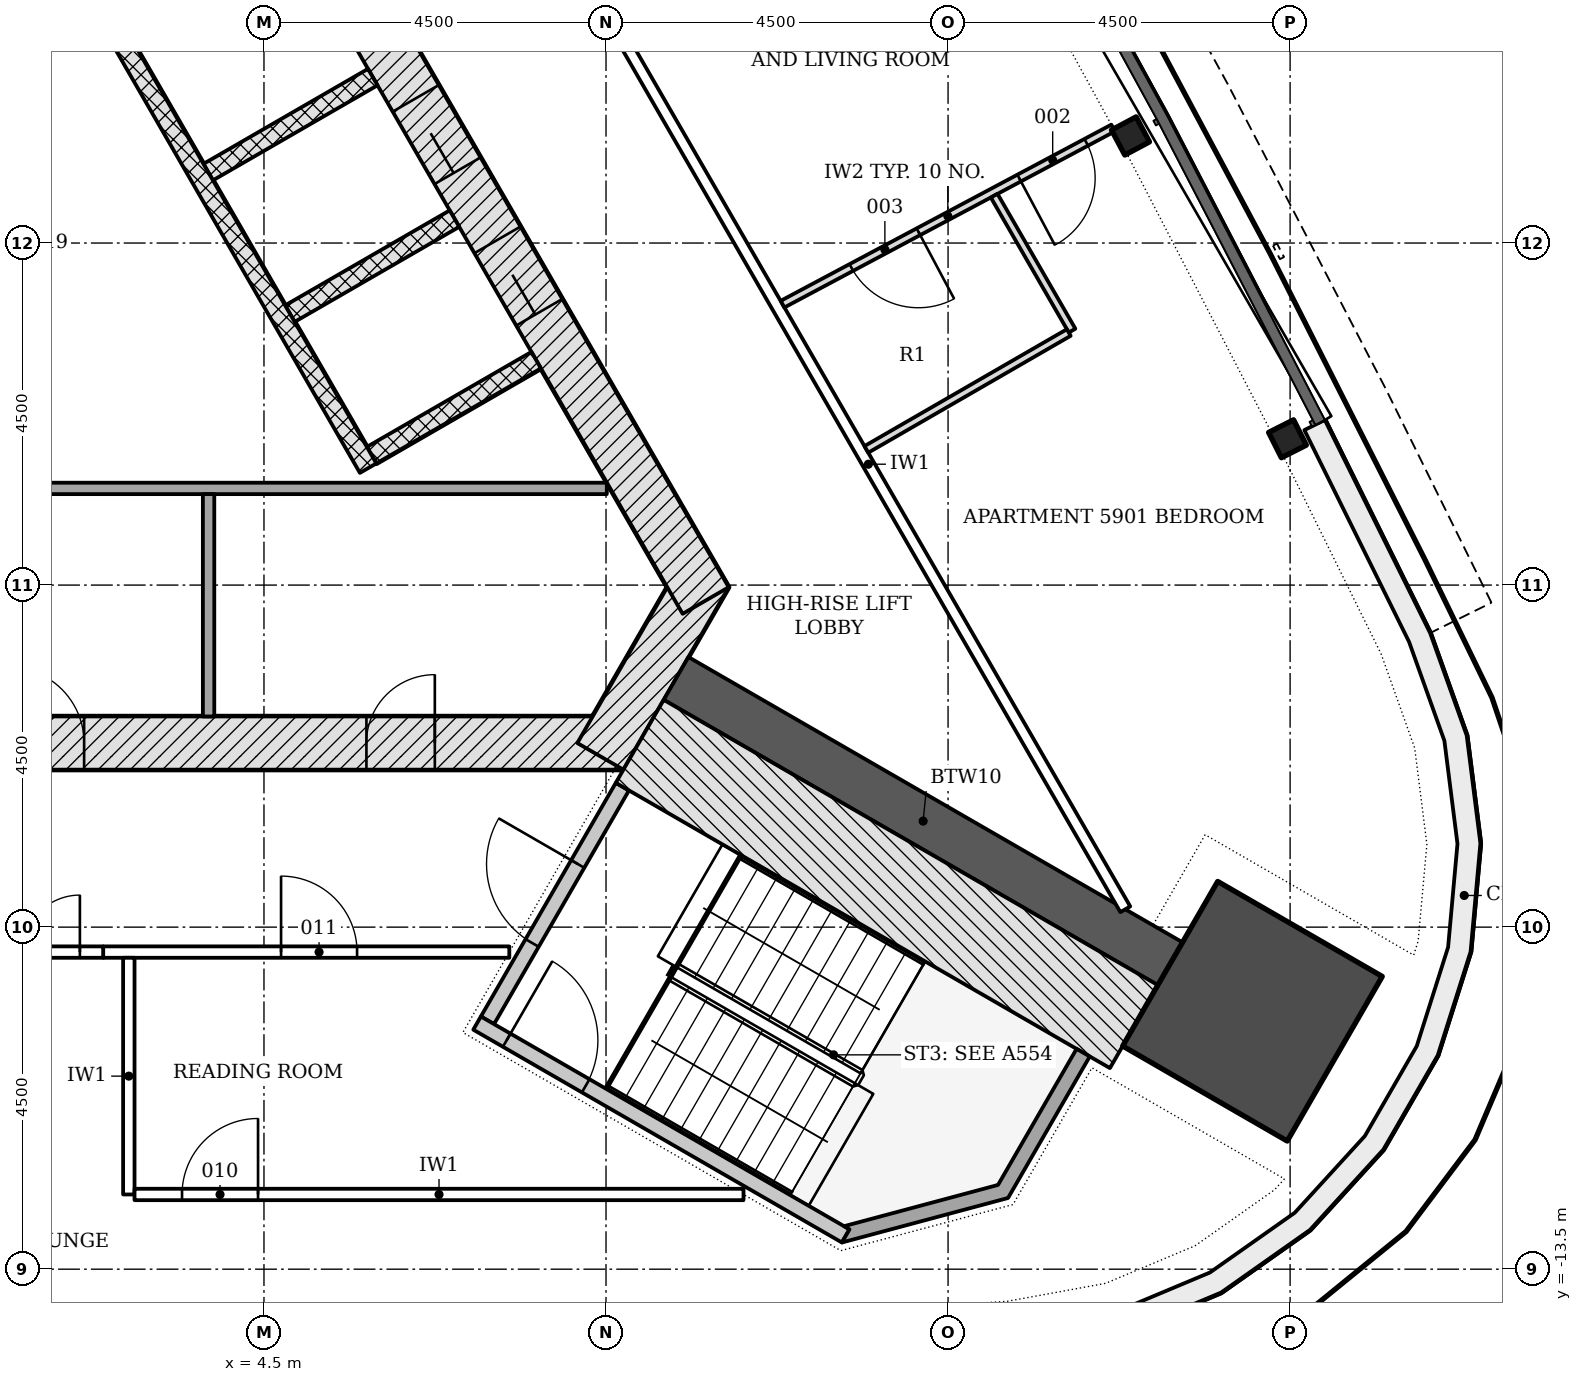
"""IFC4 building model, lengths in metres.
Left out: names, types, materials, properties, quantities, classifications, styles, units other than length and angle.
Written with IfcOpenShell. Run it as: python <this file> out.ifc"""

import sys

from ifc_helpers import new_model, si_unit, direction, frame, frame_2d, origin, origin_2d, place, context, subcontext, project, spatial, polyline, rectangle, i_section, outline, extrude, element, fill, save


model = new_model("IFC4")
c1 = context("Model", 3, precision=1e-05, world=origin(), true_north=direction((0.0, 1.0)))
c2 = subcontext(c1, "Body", "Model", "MODEL_VIEW")
j1 = project(units=[si_unit("LENGTHUNIT", "METRE"), si_unit("PLANEANGLEUNIT", "RADIAN")], contexts=[c1])
p1 = place(None, origin())
s1 = spatial("IfcSite", under=j1, at=p1, CompositionType="ELEMENT")
p2 = place(p1, origin())
s2 = spatial("IfcBuilding", under=s1, at=p2, CompositionType="ELEMENT")
p3 = place(p2, frame((0.0, 0.0, 229.2)))
s3 = spatial("IfcBuildingStorey", under=s2, at=p3, CompositionType="ELEMENT", Elevation=229.2)
p4 = place(p3, frame((-9.229, -6.578, -0.2), z_axis=(0.0, 0.0, 1.0), x_axis=(1.0, 0.0, 0.0)))
e1 = element("IfcWall", 1, at=p4, inside=s3, PredefinedType="SHEAR", context=c2, shape_type="SweptSolid", body=[
    extrude(rectangle(XDim=18.458, YDim=0.7, at=frame_2d((9.229, 0.0))), origin(), (0.0, 0.0, 1.0), 3.6),
])
p5 = place(p4, frame((7.5, 0.0, 0.2)))
e2 = element("IfcOpeningElement", 2, at=p5, cuts=e1, PredefinedType="OPENING", context=c2, shape_type="SweptSolid", body=[
    extrude(rectangle(XDim=1.0, YDim=2.1, at=frame_2d((0.5, 1.05))), frame((0.0, 0.36, 0.0), z_axis=(0.0, -1.0, 0.0), x_axis=(1.0, 0.0, 0.0)), (0.0, 0.0, 1.0), 0.72),
])
p6 = place(p4, frame((3.389, 0.0, 0.2)))
e3 = element("IfcOpeningElement", 3, at=p6, cuts=e1, PredefinedType="OPENING", context=c2, shape_type="SweptSolid", body=[
    extrude(rectangle(XDim=0.9, YDim=2.1, at=frame_2d((0.45, 1.05))), frame((0.0, 0.36, 0.0), z_axis=(0.0, -1.0, 0.0), x_axis=(1.0, 0.0, 0.0)), (0.0, 0.0, 1.0), 0.72),
])
p7 = place(p4, frame((10.363, 0.0, 0.2)))
e4 = element("IfcOpeningElement", 4, at=p7, cuts=e1, PredefinedType="OPENING", context=c2, shape_type="SweptSolid", body=[
    extrude(rectangle(XDim=1.0, YDim=2.1, at=frame_2d((0.5, 1.05))), frame((0.0, 0.36, 0.0), z_axis=(0.0, -1.0, 0.0), x_axis=(1.0, 0.0, 0.0)), (0.0, 0.0, 1.0), 0.72),
])
p8 = place(p4, frame((15.077, 0.0, 0.2)))
e5 = element("IfcOpeningElement", 5, at=p8, cuts=e1, PredefinedType="OPENING", context=c2, shape_type="SweptSolid", body=[
    extrude(rectangle(XDim=0.9, YDim=2.1, at=frame_2d((0.45, 1.05))), frame((0.0, 0.36, 0.0), z_axis=(0.0, -1.0, 0.0), x_axis=(1.0, 0.0, 0.0)), (0.0, 0.0, 1.0), 0.72),
])
p9 = place(p3, frame((8.926, -6.753, -0.2), z_axis=(0.0, 0.0, 1.0), x_axis=(0.500042739161, 0.866000726912, 0.0)))
e6 = element("IfcWall", 6, at=p9, inside=s3, PredefinedType="SHEAR", context=c2, shape_type="SweptSolid", body=[
    extrude(rectangle(XDim=2.771, YDim=0.7, at=frame_2d((1.386, 0.0))), origin(), (0.0, 0.0, 1.0), 3.6),
])
p10 = place(p3, frame((10.311, -4.703, -0.2), z_axis=(0.0, 0.0, 1.0), x_axis=(-0.500001446645, 0.866024568562, 0.0)))
e7 = element("IfcWall", 7, at=p10, inside=s3, PredefinedType="SHEAR", context=c2, shape_type="SweptSolid", body=[
    extrude(rectangle(XDim=18.458, YDim=0.7, at=frame_2d((9.229, 0.0))), origin(), (0.0, 0.0, 1.0), 3.6),
])
p11 = place(p10, frame((4.379, 0.0, 0.2)))
e8 = element("IfcOpeningElement", 8, at=p11, cuts=e7, PredefinedType="OPENING", context=c2, shape_type="SweptSolid", body=[
    extrude(rectangle(XDim=1.1, YDim=2.1, at=frame_2d((0.55, 1.05))), frame((0.0, 0.36, 0.0), z_axis=(0.0, -1.0, 0.0), x_axis=(1.0, 0.0, 0.0)), (0.0, 0.0, 1.0), 0.72),
])
p12 = place(p10, frame((6.529, 0.0, 0.2)))
e9 = element("IfcOpeningElement", 9, at=p12, cuts=e7, PredefinedType="OPENING", context=c2, shape_type="SweptSolid", body=[
    extrude(rectangle(XDim=1.1, YDim=2.1, at=frame_2d((0.55, 1.05))), frame((0.0, 0.36, 0.0), z_axis=(0.0, -1.0, 0.0), x_axis=(1.0, 0.0, 0.0)), (0.0, 0.0, 1.0), 0.72),
])
p13 = place(p10, frame((8.679, 0.0, 0.2)))
e10 = element("IfcOpeningElement", 10, at=p13, cuts=e7, PredefinedType="OPENING", context=c2, shape_type="SweptSolid", body=[
    extrude(rectangle(XDim=1.1, YDim=2.1, at=frame_2d((0.55, 1.05))), frame((0.0, 0.36, 0.0), z_axis=(0.0, -1.0, 0.0), x_axis=(1.0, 0.0, 0.0)), (0.0, 0.0, 1.0), 0.72),
])
p14 = place(p10, frame((10.829, 0.0, 0.2)))
e11 = element("IfcOpeningElement", 11, at=p14, cuts=e7, PredefinedType="OPENING", context=c2, shape_type="SweptSolid", body=[
    extrude(rectangle(XDim=1.1, YDim=2.1, at=frame_2d((0.55, 1.05))), frame((0.0, 0.36, 0.0), z_axis=(0.0, -1.0, 0.0), x_axis=(1.0, 0.0, 0.0)), (0.0, 0.0, 1.0), 0.72),
])
p15 = place(p10, frame((12.979, 0.0, 0.2)))
e12 = element("IfcOpeningElement", 12, at=p15, cuts=e7, PredefinedType="OPENING", context=c2, shape_type="SweptSolid", body=[
    extrude(rectangle(XDim=1.1, YDim=2.1, at=frame_2d((0.55, 1.05))), frame((0.0, 0.36, 0.0), z_axis=(0.0, -1.0, 0.0), x_axis=(1.0, 0.0, 0.0)), (0.0, 0.0, 1.0), 0.72),
])
p16 = place(p3, frame((9.922, -5.728, -0.2), z_axis=(0.0, 0.0, 1.0), x_axis=(0.866026891245, -0.499997423634, 0.0)))
e13 = element("IfcWall", 13, at=p16, inside=s3, PredefinedType="SHEAR", context=c2, shape_type="SweptSolid", body=[
    extrude(rectangle(XDim=7.506, YDim=0.65, at=frame_2d((3.753, 0.0))), origin(), (0.0, 0.0, 1.0), 3.6),
])
p17 = place(p3, frame((17.505, -10.106, -0.2), z_axis=(0.0, 0.0, 1.0), x_axis=(0.866025403784, -0.5, 0.0)))
e14 = element("IfcColumn", 14, at=p17, inside=s3, PredefinedType="COLUMN", context=c2, shape_type="SweptSolid", body=[
    extrude(rectangle(XDim=2.5, YDim=2.5, at=origin_2d()), origin(), (0.0, 0.0, 1.0), 3.6),
])
for number, where, z_axis, x_axis in (
    (15, (17.965, -2.575, -0.2), (0.0, 0.0, 1.0), (-0.45, 0.893, 0.0)),
    (16, (15.9, 1.409, -0.2), (0.0, 0.0, 1.0), (-0.47, 0.883, 0.0)),
):
    element("IfcColumn", number, at=place(p3, frame(where, z_axis=z_axis, x_axis=x_axis)), inside=s3, PredefinedType="COLUMN", context=c2, shape_type="SweptSolid", body=[
        extrude(i_section(OverallWidth=0.373, OverallDepth=0.368, WebThickness=0.015, FlangeThickness=0.024, FilletRadius=0.015, at=origin_2d()), origin(), (0.0, 0.0, 1.0), 3.6),
    ])
p18 = place(p3, origin())
e17 = element("IfcWall", 17, at=p18, inside=s3, PredefinedType="NOTDEFINED", context=c2, shape_type="SweptSolid", body=[
    extrude(outline(polyline([(11.244, -14.82), (14.364, -14.619), (15.772, -14.361), (17.092, -13.808), (18.261, -12.983), (19.227, -11.927), (19.942, -10.687), (20.375, -9.323), (20.504, -7.898), (20.323, -6.478), (19.842, -5.13), (18.457, -2.328), (18.188, -2.46), (19.565, -5.248), (20.03, -6.548), (20.202, -7.903), (20.079, -9.264), (19.666, -10.566), (18.983, -11.748), (18.062, -12.757), (16.945, -13.544), (15.686, -14.072), (14.327, -14.32), (11.225, -14.521), (11.244, -14.82)])), origin(), (0.0, 0.0, 1.0), 3.3),
])
for number, where, z_axis, x_axis in (
    (18, (8.081, -1.541, -0.2), (0.0, 0.0, 1.0), (-0.866, -0.5, 0.0)),
    (19, (7.006, 0.321, -0.2), (0.0, 0.0, 1.0), (-0.866, -0.5, 0.0)),
):
    element("IfcWall", number, at=place(p3, frame(where, z_axis=z_axis, x_axis=x_axis)), inside=s3, PredefinedType="PARTITIONING", context=c2, shape_type="SweptSolid", body=[
        extrude(rectangle(XDim=2.5, YDim=0.25, at=frame_2d((1.25, 0.0))), origin(), (0.0, 0.0, 1.0), 3.6),
    ])
p19 = place(p3, frame((5.931, 2.183, -0.2), z_axis=(0.0, 0.0, 1.0), x_axis=(-0.866047370643, -0.499961950354, 0.0)))
e20 = element("IfcWall", 20, at=p19, inside=s3, PredefinedType="PARTITIONING", context=c2, shape_type="SweptSolid", body=[
    extrude(rectangle(XDim=2.5, YDim=0.25, at=frame_2d((1.25, 0.0))), origin(), (0.0, 0.0, 1.0), 3.6),
])
p20 = place(p3, frame((5.87, -2.961, 0.0), z_axis=(0.0, 0.0, 1.0), x_axis=(-0.50000615651, 0.866021849293, 0.0)))
e21 = element("IfcWall", 21, at=p20, inside=s3, PredefinedType="PARTITIONING", context=c2, shape_type="SweptSolid", body=[
    extrude(rectangle(XDim=11.0, YDim=0.25, at=frame_2d((5.5, 0.0))), origin(), (0.0, 0.0, 1.0), 3.4),
])
p21 = place(p3, frame((-0.129, -3.228, 0.0), z_axis=(0.0, 0.0, 1.0), x_axis=(1.0, 0.0, 0.0)))
e22 = element("IfcWall", 22, at=p21, inside=s3, PredefinedType="PARTITIONING", context=c2, shape_type="SweptSolid", body=[
    extrude(rectangle(XDim=9.139, YDim=0.15, at=frame_2d((4.57, 0.0))), origin(), (0.0, 0.0, 1.0), 3.4),
])
p22 = place(p3, frame((3.771, -3.303, 0.0), z_axis=(0.0, 0.0, 1.0), x_axis=(0.0, -1.0, 0.0)))
e23 = element("IfcWall", 23, at=p22, inside=s3, PredefinedType="PARTITIONING", context=c2, shape_type="SweptSolid", body=[
    extrude(rectangle(XDim=2.925, YDim=0.15, at=frame_2d((1.462, 0.0))), origin(), (0.0, 0.0, 1.0), 3.4),
])
p23 = place(p3, frame((7.44, -10.226, -0.2), z_axis=(0.0, 0.0, 1.0), x_axis=(0.500022077904, 0.866012656725, 0.0)))
e24 = element("IfcWall", 24, at=p23, inside=s3, PredefinedType="SHEAR", context=c2, shape_type="SweptSolid", body=[
    extrude(rectangle(XDim=3.55, YDim=0.2, at=frame_2d((1.775, 0.0))), origin(), (0.0, 0.0, 1.0), 3.6),
])
p24 = place(p23, frame((1.175, 0.0, 0.2)))
e25 = element("IfcOpeningElement", 25, at=p24, cuts=e24, PredefinedType="OPENING", context=c2, shape_type="SweptSolid", body=[
    extrude(rectangle(XDim=1.2, YDim=2.1, at=frame_2d((0.6, 1.05))), frame((0.0, 0.11, 0.0), z_axis=(0.0, -1.0, 0.0), x_axis=(1.0, 0.0, 0.0)), (0.0, 0.0, 1.0), 0.22),
])
p25 = place(p3, frame((7.304, -10.262, -0.2), z_axis=(0.0, 0.0, 1.0), x_axis=(0.866026594901, -0.49999793692, 0.0)))
e26 = element("IfcWall", 26, at=p25, inside=s3, PredefinedType="SHEAR", context=c2, shape_type="SweptSolid", body=[
    extrude(rectangle(XDim=5.6, YDim=0.2, at=frame_2d((2.8, 0.0))), origin(), (0.0, 0.0, 1.0), 3.6),
])
p26 = place(p25, frame((0.45, 0.0, 0.2)))
e27 = element("IfcOpeningElement", 27, at=p26, cuts=e26, PredefinedType="OPENING", context=c2, shape_type="SweptSolid", body=[
    extrude(rectangle(XDim=1.2, YDim=2.1, at=frame_2d((0.6, 1.05))), frame((0.0, 0.11, 0.0), z_axis=(0.0, -1.0, 0.0), x_axis=(1.0, 0.0, 0.0)), (0.0, 0.0, 1.0), 0.22),
])
p27 = place(p3, frame((9.444, -6.555, -0.2), z_axis=(0.0, 0.0, 1.0), x_axis=(0.866020939036, -0.500007733091, 0.0)))
e28 = element("IfcWall", 28, at=p27, inside=s3, PredefinedType="SHEAR", context=c2, shape_type="SweptSolid", body=[
    extrude(rectangle(XDim=7.507, YDim=1.261, at=frame_2d((3.753, 0.0))), origin(), (0.0, 0.0, 1.0), 3.6),
])
p28 = place(p3, frame((0.0, 0.0, -0.2)))
e29 = element("IfcWall", 29, at=p28, inside=s3, PredefinedType="SHEAR", context=c2, shape_type="SweptSolid", body=[
    extrude(outline(polyline([(12.104, -13.149), (14.289, -12.563), (15.364, -10.701), (15.191, -10.601), (14.157, -12.392), (12.132, -12.934), (12.204, -12.976), (12.204, -12.976), (12.204, -12.976), (12.204, -12.976), (12.204, -12.976), (12.204, -12.976), (12.204, -12.976), (12.204, -12.976), (12.204, -12.976), (12.204, -12.976), (12.204, -12.976), (12.204, -12.976), (12.204, -12.976), (12.204, -12.976), (12.204, -12.976), (12.204, -12.976), (12.204, -12.976), (12.104, -13.149)])), origin(), (0.0, 0.0, 1.0), 3.6),
])
p29 = place(p3, frame((15.832, -8.765, 0.0), z_axis=(0.0, 0.0, 1.0), x_axis=(-0.500008967739, 0.866020226196, 0.0)))
e30 = element("IfcWall", 30, at=p29, inside=s3, PredefinedType="PARTITIONING", context=c2, shape_type="SweptSolid", body=[
    extrude(rectangle(XDim=13.523, YDim=0.15, at=frame_2d((6.761, 0.0))), origin(), (0.0, 0.0, 1.0), 2.852),
])
p30 = place(p3, frame((15.672, 1.514, 0.0), z_axis=(0.0, 0.0, 1.0), x_axis=(-0.882503735513, -0.47030538675, 0.0)))
e31 = element("IfcWall", 31, at=p30, inside=s3, PredefinedType="PARTITIONING", context=c2, shape_type="SweptSolid", body=[
    extrude(rectangle(XDim=4.928, YDim=0.1, at=frame_2d((2.464, 0.0))), origin(), (0.0, 0.0, 1.0), 3.4),
])
p31 = place(p30, frame((0.401, 0.0, 0.0)))
e32 = element("IfcOpeningElement", 32, at=p31, cuts=e31, PredefinedType="OPENING", context=c2, shape_type="SweptSolid", body=[
    extrude(rectangle(XDim=1.0, YDim=2.1, at=frame_2d((0.5, 1.05))), frame((0.0, 0.06, 0.0), z_axis=(0.0, -1.0, 0.0), x_axis=(1.0, 0.0, 0.0)), (0.0, 0.0, 1.0), 0.12),
])
p32 = place(p30, frame((2.903, 0.0, 0.0)))
e33 = element("IfcOpeningElement", 33, at=p32, cuts=e31, PredefinedType="OPENING", context=c2, shape_type="SweptSolid", body=[
    extrude(rectangle(XDim=1.0, YDim=2.1, at=frame_2d((0.5, 1.05))), frame((0.0, 0.06, 0.0), z_axis=(0.0, -1.0, 0.0), x_axis=(1.0, 0.0, 0.0)), (0.0, 0.0, 1.0), 0.12),
])
p33 = place(p3, frame((14.107, 0.623, 0.0), z_axis=(0.0, 0.0, 1.0), x_axis=(0.499956128963, -0.866050731258, 0.0)))
e34 = element("IfcWall", 34, at=p33, inside=s3, PredefinedType="PARTITIONING", context=c2, shape_type="SweptSolid", body=[
    extrude(rectangle(XDim=2.05, YDim=0.1, at=frame_2d((1.025, 0.0))), origin(), (0.0, 0.0, 1.0), 2.852),
])
p34 = place(p3, frame((15.088, -1.177, 0.0), z_axis=(0.0, 0.0, 1.0), x_axis=(-0.866016353143, -0.500015675843, 0.0)))
e35 = element("IfcWall", 35, at=p34, inside=s3, PredefinedType="PARTITIONING", context=c2, shape_type="SweptSolid", body=[
    extrude(rectangle(XDim=3.075, YDim=0.1, at=frame_2d((1.538, 0.0))), origin(), (0.0, 0.0, 1.0), 3.4),
])
p35 = place(p3, frame((2.384, -9.328, 0.0), z_axis=(0.0, 0.0, 1.0), x_axis=(1.0, 0.0, 0.0)))
e36 = element("IfcWall", 36, at=p35, inside=s3, PredefinedType="PARTITIONING", context=c2, shape_type="SweptSolid", body=[
    extrude(rectangle(XDim=5.343, YDim=0.15, at=frame_2d((2.672, 0.0))), origin(), (0.0, 0.0, 1.0), 2.852),
])
p36 = place(p35, frame((2.341, 0.0, 0.0)))
e37 = element("IfcOpeningElement", 37, at=p36, cuts=e36, PredefinedType="OPENING", context=c2, shape_type="SweptSolid", body=[
    extrude(rectangle(XDim=1.0, YDim=2.1, at=frame_2d((0.5, 1.05))), frame((0.0, 0.085, 0.0), z_axis=(0.0, -1.0, 0.0), x_axis=(1.0, 0.0, 0.0)), (0.0, 0.0, 1.0), 0.17),
])
p37 = place(p3, frame((-1.984, -9.328, 0.0), z_axis=(0.0, 0.0, 1.0), x_axis=(1.0, 0.0, 0.0)))
e38 = element("IfcWall", 38, at=p37, inside=s3, PredefinedType="PARTITIONING", context=c2, shape_type="SweptSolid", body=[
    extrude(rectangle(XDim=4.369, YDim=0.15, at=frame_2d((2.184, 0.0))), origin(), (0.0, 0.0, 1.0), 2.852),
])
p38 = place(p37, frame((2.562, 0.0, 0.0)))
e39 = element("IfcOpeningElement", 39, at=p38, cuts=e38, PredefinedType="OPENING", context=c2, shape_type="SweptSolid", body=[
    extrude(rectangle(XDim=1.5, YDim=2.1, at=frame_2d((0.75, 1.05))), frame((0.0, 0.085, 0.0), z_axis=(0.0, -1.0, 0.0), x_axis=(1.0, 0.0, 0.0)), (0.0, 0.0, 1.0), 0.17),
])
p39 = place(p3, frame((2.722, -9.403, 0.0), z_axis=(0.0, 0.0, 1.0), x_axis=(0.0, -1.0, 0.0)))
e40 = element("IfcWall", 40, at=p39, inside=s3, PredefinedType="PARTITIONING", context=c2, shape_type="SweptSolid", body=[
    extrude(rectangle(XDim=3.114, YDim=0.15, at=frame_2d((1.557, 0.0))), origin(), (0.0, 0.0, 1.0), 3.4),
])
p40 = place(p3, frame((2.797, -12.517, 0.0), z_axis=(0.0, 0.0, 1.0), x_axis=(1.0, 0.0, 0.0)))
e41 = element("IfcWall", 41, at=p40, inside=s3, PredefinedType="PARTITIONING", context=c2, shape_type="SweptSolid", body=[
    extrude(rectangle(XDim=8.012, YDim=0.15, at=frame_2d((4.006, 0.0))), origin(), (0.0, 0.0, 1.0), 2.852),
])
p41 = place(p40, frame((0.625, 0.0, 0.0)))
e42 = element("IfcOpeningElement", 42, at=p41, cuts=e41, PredefinedType="OPENING", context=c2, shape_type="SweptSolid", body=[
    extrude(rectangle(XDim=1.0, YDim=2.1, at=frame_2d((0.5, 1.05))), frame((0.0, 0.085, 0.0), z_axis=(0.0, -1.0, 0.0), x_axis=(1.0, 0.0, 0.0)), (0.0, 0.0, 1.0), 0.17),
])
p42 = place(p11, origin())
e43 = element("IfcDoor", 43, at=p42, inside=s3, OperationType="DOUBLE_DOOR_SLIDING", PredefinedType="DOOR", context=c2, shape_type="SweptSolid", body=[
    extrude(rectangle(XDim=1.1, YDim=2.1, at=frame_2d((0.55, 1.05))), frame((0.0, 0.025, 0.0), z_axis=(0.0, -1.0, 0.0), x_axis=(1.0, 0.0, 0.0)), (0.0, 0.0, 1.0), 0.05),
])
fill(e8, e43)
p43 = place(p12, origin())
e44 = element("IfcDoor", 44, at=p43, inside=s3, OperationType="DOUBLE_DOOR_SLIDING", PredefinedType="DOOR", context=c2, shape_type="SweptSolid", body=[
    extrude(rectangle(XDim=1.1, YDim=2.1, at=frame_2d((0.55, 1.05))), frame((0.0, 0.025, 0.0), z_axis=(0.0, -1.0, 0.0), x_axis=(1.0, 0.0, 0.0)), (0.0, 0.0, 1.0), 0.05),
])
fill(e9, e44)
p44 = place(p7, origin())
e45 = element("IfcDoor", 45, at=p44, inside=s3, OperationType="SINGLE_SWING_LEFT", PredefinedType="DOOR", context=c2, shape_type="SweptSolid", body=[
    extrude(rectangle(XDim=1.0, YDim=2.1, at=frame_2d((0.5, 1.05))), frame((0.0, 0.075, 0.0), z_axis=(0.0, -1.0, 0.0), x_axis=(1.0, 0.0, 0.0)), (0.0, 0.0, 1.0), 0.15),
])
fill(e4, e45)
p45 = place(p8, origin())
e46 = element("IfcDoor", 46, at=p45, inside=s3, OperationType="SINGLE_SWING_RIGHT", PredefinedType="DOOR", context=c2, shape_type="SweptSolid", body=[
    extrude(rectangle(XDim=0.9, YDim=2.1, at=frame_2d((0.45, 1.05))), frame((0.0, 0.075, 0.0), z_axis=(0.0, -1.0, 0.0), x_axis=(1.0, 0.0, 0.0)), (0.0, 0.0, 1.0), 0.15),
])
fill(e5, e46)
p46 = place(p24, origin())
e47 = element("IfcDoor", 47, at=p46, inside=s3, OperationType="SINGLE_SWING_RIGHT", PredefinedType="DOOR", context=c2, shape_type="SweptSolid", body=[
    extrude(rectangle(XDim=1.2, YDim=2.1, at=frame_2d((0.6, 1.05))), frame((0.0, 0.025, 0.0), z_axis=(0.0, -1.0, 0.0), x_axis=(1.0, 0.0, 0.0)), (0.0, 0.0, 1.0), 0.05),
])
fill(e25, e47)
p47 = place(p26, origin())
e48 = element("IfcDoor", 48, at=p47, inside=s3, OperationType="SINGLE_SWING_LEFT", PredefinedType="DOOR", context=c2, shape_type="SweptSolid", body=[
    extrude(rectangle(XDim=1.2, YDim=2.1, at=frame_2d((0.6, 1.05))), frame((0.0, 0.025, 0.0), z_axis=(0.0, -1.0, 0.0), x_axis=(1.0, 0.0, 0.0)), (0.0, 0.0, 1.0), 0.05),
])
fill(e27, e48)
p48 = place(p31, origin())
e49 = element("IfcDoor", 49, at=p48, inside=s3, OperationType="SINGLE_SWING_RIGHT", PredefinedType="DOOR", context=c2, shape_type="SweptSolid", body=[
    extrude(rectangle(XDim=1.0, YDim=2.1, at=frame_2d((0.5, 1.05))), frame((0.0, 0.025, 0.0), z_axis=(0.0, -1.0, 0.0), x_axis=(1.0, 0.0, 0.0)), (0.0, 0.0, 1.0), 0.05),
])
fill(e32, e49)
p49 = place(p32, origin())
e50 = element("IfcDoor", 50, at=p49, inside=s3, OperationType="SINGLE_SWING_LEFT", PredefinedType="DOOR", context=c2, shape_type="SweptSolid", body=[
    extrude(rectangle(XDim=1.0, YDim=2.1, at=frame_2d((0.5, 1.05))), frame((0.0, 0.025, 0.0), z_axis=(0.0, -1.0, 0.0), x_axis=(1.0, 0.0, 0.0)), (0.0, 0.0, 1.0), 0.05),
])
fill(e33, e50)
p50 = place(p38, origin())
e51 = element("IfcDoor", 51, at=p50, inside=s3, OperationType="DOUBLE_DOOR_SINGLE_SWING", PredefinedType="DOOR", context=c2, shape_type="SweptSolid", body=[
    extrude(rectangle(XDim=1.5, YDim=2.1, at=frame_2d((0.75, 1.05))), frame((0.0, 0.025, 0.0), z_axis=(0.0, -1.0, 0.0), x_axis=(1.0, 0.0, 0.0)), (0.0, 0.0, 1.0), 0.05),
])
fill(e39, e51)
p51 = place(p41, origin())
e52 = element("IfcDoor", 52, at=p51, inside=s3, OperationType="SINGLE_SWING_RIGHT", PredefinedType="DOOR", context=c2, shape_type="SweptSolid", body=[
    extrude(rectangle(XDim=1.0, YDim=2.1, at=frame_2d((0.5, 1.05))), frame((0.0, 0.025, 0.0), z_axis=(0.0, -1.0, 0.0), x_axis=(1.0, 0.0, 0.0)), (0.0, 0.0, 1.0), 0.05),
])
fill(e42, e52)
p52 = place(p36, origin())
e53 = element("IfcDoor", 53, at=p52, inside=s3, OperationType="SINGLE_SWING_LEFT", PredefinedType="DOOR", context=c2, shape_type="SweptSolid", body=[
    extrude(rectangle(XDim=1.0, YDim=2.1, at=frame_2d((0.5, 1.05))), frame((0.0, 0.025, 0.0), z_axis=(0.0, -1.0, 0.0), x_axis=(1.0, 0.0, 0.0)), (0.0, 0.0, 1.0), 0.05),
])
fill(e37, e53)
save(model, sys.argv[1])
